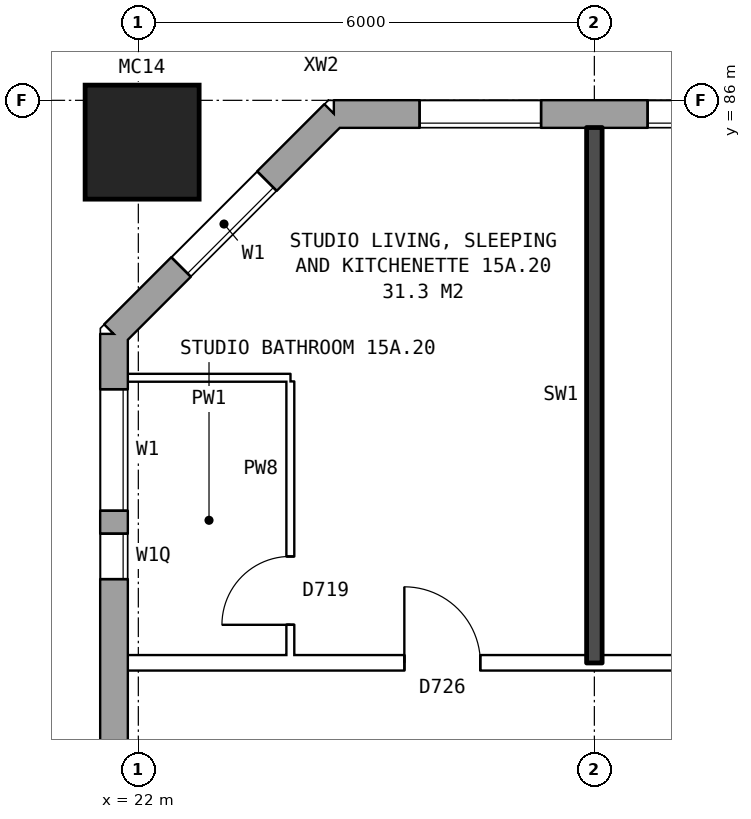
"""IFC4 building model, lengths in metres.
Left out: names, types, materials, properties, quantities, classifications, styles, units other than length and angle.
Written with IfcOpenShell. Run it as: python <this file> out.ifc"""

import sys

from ifc_helpers import new_model, si_unit, direction, frame, frame_2d, origin, origin_2d, place, context, subcontext, project, spatial, rectangle, hollow_rectangle, extrude, element, fill, save


model = new_model("IFC4")
c1 = context("Model", 3, precision=1e-05, world=origin(), true_north=direction((0.0, 1.0)))
c2 = subcontext(c1, "Body", "Model", "MODEL_VIEW")
j1 = project(units=[si_unit("LENGTHUNIT", "METRE"), si_unit("PLANEANGLEUNIT", "RADIAN")], contexts=[c1])
p1 = place(None, origin())
s1 = spatial("IfcSite", under=j1, at=p1, CompositionType="ELEMENT")
p2 = place(p1, origin())
s2 = spatial("IfcBuilding", under=s1, at=p2, CompositionType="ELEMENT")
p3 = place(p2, frame((0.0, 0.0, 56.7)))
s3 = spatial("IfcBuildingStorey", under=s2, at=p3, CompositionType="ELEMENT", Elevation=56.7)
p4 = place(p3, frame((22.05, 85.45, 0.0), z_axis=(0.0, 0.0, 1.0), x_axis=(1.0, 0.0, 0.0)))
e1 = element("IfcColumn", 1, at=p4, inside=s3, PredefinedType="COLUMN", context=c2, shape_type="SweptSolid", body=[
    extrude(hollow_rectangle(XDim=1.5, YDim=1.5, WallThickness=0.08, at=origin_2d()), origin(), (0.0, 0.0, 1.0), 3.1),
])
p5 = place(p3, frame((72.925, 85.82, 0.0), z_axis=(0.0, 0.0, 1.0), x_axis=(-1.0, 0.0, 0.0)))
e2 = element("IfcWall", 2, at=p5, inside=s3, PredefinedType="STANDARD", context=c2, shape_type="SweptSolid", body=[
    extrude(rectangle(XDim=48.351, YDim=0.36, at=frame_2d((24.175, 0.0))), origin(), (0.0, 0.0, 1.0), 2.85),
])
p6 = place(p5, frame((0.625, 0.0, 0.8)))
e3 = element("IfcOpeningElement", 3, at=p6, cuts=e2, PredefinedType="OPENING", context=c2, shape_type="SweptSolid", body=[
    extrude(rectangle(XDim=1.6, YDim=1.8, at=frame_2d((0.8, 0.9))), frame((0.0, 0.19, 0.0), z_axis=(0.0, -1.0, 0.0), x_axis=(1.0, 0.0, 0.0)), (0.0, 0.0, 1.0), 0.38),
])
p7 = place(p5, frame((3.625, 0.0, 0.8)))
e4 = element("IfcOpeningElement", 4, at=p7, cuts=e2, PredefinedType="OPENING", context=c2, shape_type="SweptSolid", body=[
    extrude(rectangle(XDim=1.6, YDim=1.8, at=frame_2d((0.8, 0.9))), frame((0.0, 0.19, 0.0), z_axis=(0.0, -1.0, 0.0), x_axis=(1.0, 0.0, 0.0)), (0.0, 0.0, 1.0), 0.38),
])
p8 = place(p5, frame((6.625, 0.0, 0.8)))
e5 = element("IfcOpeningElement", 5, at=p8, cuts=e2, PredefinedType="OPENING", context=c2, shape_type="SweptSolid", body=[
    extrude(rectangle(XDim=1.6, YDim=1.8, at=frame_2d((0.8, 0.9))), frame((0.0, 0.19, 0.0), z_axis=(0.0, -1.0, 0.0), x_axis=(1.0, 0.0, 0.0)), (0.0, 0.0, 1.0), 0.38),
])
p9 = place(p5, frame((9.625, 0.0, 0.8)))
e6 = element("IfcOpeningElement", 6, at=p9, cuts=e2, PredefinedType="OPENING", context=c2, shape_type="SweptSolid", body=[
    extrude(rectangle(XDim=1.6, YDim=1.8, at=frame_2d((0.8, 0.9))), frame((0.0, 0.19, 0.0), z_axis=(0.0, -1.0, 0.0), x_axis=(1.0, 0.0, 0.0)), (0.0, 0.0, 1.0), 0.38),
])
p10 = place(p5, frame((12.625, 0.0, 0.8)))
e7 = element("IfcOpeningElement", 7, at=p10, cuts=e2, PredefinedType="OPENING", context=c2, shape_type="SweptSolid", body=[
    extrude(rectangle(XDim=1.6, YDim=1.8, at=frame_2d((0.8, 0.9))), frame((0.0, 0.19, 0.0), z_axis=(0.0, -1.0, 0.0), x_axis=(1.0, 0.0, 0.0)), (0.0, 0.0, 1.0), 0.38),
])
p11 = place(p5, frame((15.125, 0.0, 0.8)))
e8 = element("IfcOpeningElement", 8, at=p11, cuts=e2, PredefinedType="OPENING", context=c2, shape_type="SweptSolid", body=[
    extrude(rectangle(XDim=1.0, YDim=1.8, at=frame_2d((0.5, 0.9))), frame((0.0, 0.19, 0.0), z_axis=(0.0, -1.0, 0.0), x_axis=(1.0, 0.0, 0.0)), (0.0, 0.0, 1.0), 0.38),
])
p12 = place(p5, frame((18.625, 0.0, 0.65)))
e9 = element("IfcOpeningElement", 9, at=p12, cuts=e2, PredefinedType="OPENING", context=c2, shape_type="SweptSolid", body=[
    extrude(rectangle(XDim=0.8, YDim=0.9, at=frame_2d((0.4, 0.45))), frame((0.0, 0.19, 0.0), z_axis=(0.0, -1.0, 0.0), x_axis=(1.0, 0.0, 0.0)), (0.0, 0.0, 1.0), 0.38),
])
p13 = place(p5, frame((21.625, 0.0, 0.8)))
e10 = element("IfcOpeningElement", 10, at=p13, cuts=e2, PredefinedType="OPENING", context=c2, shape_type="SweptSolid", body=[
    extrude(rectangle(XDim=1.6, YDim=1.8, at=frame_2d((0.8, 0.9))), frame((0.0, 0.19, 0.0), z_axis=(0.0, -1.0, 0.0), x_axis=(1.0, 0.0, 0.0)), (0.0, 0.0, 1.0), 0.38),
])
p14 = place(p5, frame((24.625, 0.0, 0.8)))
e11 = element("IfcOpeningElement", 11, at=p14, cuts=e2, PredefinedType="OPENING", context=c2, shape_type="SweptSolid", body=[
    extrude(rectangle(XDim=1.6, YDim=1.8, at=frame_2d((0.8, 0.9))), frame((0.0, 0.19, 0.0), z_axis=(0.0, -1.0, 0.0), x_axis=(1.0, 0.0, 0.0)), (0.0, 0.0, 1.0), 0.38),
])
p15 = place(p5, frame((27.125, 0.0, 0.8)))
e12 = element("IfcOpeningElement", 12, at=p15, cuts=e2, PredefinedType="OPENING", context=c2, shape_type="SweptSolid", body=[
    extrude(rectangle(XDim=1.0, YDim=1.8, at=frame_2d((0.5, 0.9))), frame((0.0, 0.19, 0.0), z_axis=(0.0, -1.0, 0.0), x_axis=(1.0, 0.0, 0.0)), (0.0, 0.0, 1.0), 0.38),
])
p16 = place(p5, frame((28.425, 0.0, 0.8)))
e13 = element("IfcOpeningElement", 13, at=p16, cuts=e2, PredefinedType="OPENING", context=c2, shape_type="SweptSolid", body=[
    extrude(rectangle(XDim=1.0, YDim=0.9, at=frame_2d((0.5, 0.45))), frame((0.0, 0.19, 0.0), z_axis=(0.0, -1.0, 0.0), x_axis=(1.0, 0.0, 0.0)), (0.0, 0.0, 1.0), 0.38),
])
p17 = place(p5, frame((33.625, 0.0, 0.8)))
e14 = element("IfcOpeningElement", 14, at=p17, cuts=e2, PredefinedType="OPENING", context=c2, shape_type="SweptSolid", body=[
    extrude(rectangle(XDim=1.6, YDim=1.8, at=frame_2d((0.8, 0.9))), frame((0.0, 0.19, 0.0), z_axis=(0.0, -1.0, 0.0), x_axis=(1.0, 0.0, 0.0)), (0.0, 0.0, 1.0), 0.38),
])
p18 = place(p5, frame((36.625, 0.0, 0.8)))
e15 = element("IfcOpeningElement", 15, at=p18, cuts=e2, PredefinedType="OPENING", context=c2, shape_type="SweptSolid", body=[
    extrude(rectangle(XDim=1.6, YDim=1.8, at=frame_2d((0.8, 0.9))), frame((0.0, 0.19, 0.0), z_axis=(0.0, -1.0, 0.0), x_axis=(1.0, 0.0, 0.0)), (0.0, 0.0, 1.0), 0.38),
])
p19 = place(p5, frame((39.625, 0.0, 0.8)))
e16 = element("IfcOpeningElement", 16, at=p19, cuts=e2, PredefinedType="OPENING", context=c2, shape_type="SweptSolid", body=[
    extrude(rectangle(XDim=1.6, YDim=1.8, at=frame_2d((0.8, 0.9))), frame((0.0, 0.19, 0.0), z_axis=(0.0, -1.0, 0.0), x_axis=(1.0, 0.0, 0.0)), (0.0, 0.0, 1.0), 0.38),
])
p20 = place(p5, frame((42.625, 0.0, 0.8)))
e17 = element("IfcOpeningElement", 17, at=p20, cuts=e2, PredefinedType="OPENING", context=c2, shape_type="SweptSolid", body=[
    extrude(rectangle(XDim=1.6, YDim=1.8, at=frame_2d((0.8, 0.9))), frame((0.0, 0.19, 0.0), z_axis=(0.0, -1.0, 0.0), x_axis=(1.0, 0.0, 0.0)), (0.0, 0.0, 1.0), 0.38),
])
p21 = place(p5, frame((45.625, 0.0, 0.8)))
e18 = element("IfcOpeningElement", 18, at=p21, cuts=e2, PredefinedType="OPENING", context=c2, shape_type="SweptSolid", body=[
    extrude(rectangle(XDim=1.6, YDim=1.8, at=frame_2d((0.8, 0.9))), frame((0.0, 0.19, 0.0), z_axis=(0.0, -1.0, 0.0), x_axis=(1.0, 0.0, 0.0)), (0.0, 0.0, 1.0), 0.38),
])
p22 = place(p5, frame((16.425, 0.0, 1.7)))
e19 = element("IfcOpeningElement", 19, at=p22, cuts=e2, PredefinedType="OPENING", context=c2, shape_type="SweptSolid", body=[
    extrude(rectangle(XDim=1.0, YDim=0.9, at=frame_2d((0.5, 0.45))), frame((0.0, 0.19, 0.0), z_axis=(0.0, -1.0, 0.0), x_axis=(1.0, 0.0, 0.0)), (0.0, 0.0, 1.0), 0.38),
])
p23 = place(p5, frame((19.725, 0.0, 0.75)))
e20 = element("IfcOpeningElement", 20, at=p23, cuts=e2, PredefinedType="OPENING", context=c2, shape_type="SweptSolid", body=[
    extrude(rectangle(XDim=1.0, YDim=1.5, at=frame_2d((0.5, 0.75))), frame((0.0, 0.19, 0.0), z_axis=(0.0, -1.0, 0.0), x_axis=(1.0, 0.0, 0.0)), (0.0, 0.0, 1.0), 0.38),
])
p24 = place(p5, frame((30.875, 0.0, 1.7)))
e21 = element("IfcOpeningElement", 21, at=p24, cuts=e2, PredefinedType="OPENING", context=c2, shape_type="SweptSolid", body=[
    extrude(rectangle(XDim=0.6, YDim=0.9, at=frame_2d((0.3, 0.45))), frame((0.0, 0.19, 0.0), z_axis=(0.0, -1.0, 0.0), x_axis=(1.0, 0.0, 0.0)), (0.0, 0.0, 1.0), 0.38),
])
p25 = place(p5, frame((31.775, 0.0, 1.1)))
e22 = element("IfcOpeningElement", 22, at=p25, cuts=e2, PredefinedType="OPENING", context=c2, shape_type="SweptSolid", body=[
    extrude(rectangle(XDim=0.8, YDim=1.5, at=frame_2d((0.4, 0.75))), frame((0.0, 0.19, 0.0), z_axis=(0.0, -1.0, 0.0), x_axis=(1.0, 0.0, 0.0)), (0.0, 0.0, 1.0), 0.38),
])
p26 = place(p3, frame((24.575, 85.82, 0.0), z_axis=(0.0, 0.0, 1.0), x_axis=(-0.707106781187, -0.707106781187, 0.0)))
e23 = element("IfcWall", 23, at=p26, inside=s3, PredefinedType="STANDARD", context=c2, shape_type="SweptSolid", body=[
    extrude(rectangle(XDim=4.094, YDim=0.36, at=frame_2d((2.047, 0.0))), origin(), (0.0, 0.0, 1.0), 2.85),
])
p27 = place(p26, frame((1.247, 0.0, 0.8)))
e24 = element("IfcOpeningElement", 24, at=p27, cuts=e23, PredefinedType="OPENING", context=c2, shape_type="SweptSolid", body=[
    extrude(rectangle(XDim=1.6, YDim=1.8, at=frame_2d((0.8, 0.9))), frame((0.0, 0.19, 0.0), z_axis=(0.0, -1.0, 0.0), x_axis=(1.0, 0.0, 0.0)), (0.0, 0.0, 1.0), 0.38),
])
p28 = place(p3, frame((21.68, 82.925, 0.0), z_axis=(0.0, 0.0, 1.0), x_axis=(0.0, -1.0, 0.0)))
e25 = element("IfcWall", 25, at=p28, inside=s3, PredefinedType="STANDARD", context=c2, shape_type="SweptSolid", body=[
    extrude(rectangle(XDim=25.851, YDim=0.36, at=frame_2d((12.925, 0.0))), origin(), (0.0, 0.0, 1.0), 2.85),
])
p29 = place(p28, frame((0.725, 0.0, 0.8)))
e26 = element("IfcOpeningElement", 26, at=p29, cuts=e25, PredefinedType="OPENING", context=c2, shape_type="SweptSolid", body=[
    extrude(rectangle(XDim=1.6, YDim=1.8, at=frame_2d((0.8, 0.9))), frame((0.0, 0.19, 0.0), z_axis=(0.0, -1.0, 0.0), x_axis=(1.0, 0.0, 0.0)), (0.0, 0.0, 1.0), 0.38),
])
p30 = place(p28, frame((5.525, 0.0, 1.4)))
e27 = element("IfcOpeningElement", 27, at=p30, cuts=e25, PredefinedType="OPENING", context=c2, shape_type="SweptSolid", body=[
    extrude(rectangle(XDim=1.6, YDim=1.2, at=frame_2d((0.8, 0.6))), frame((0.0, 0.19, 0.0), z_axis=(0.0, -1.0, 0.0), x_axis=(1.0, 0.0, 0.0)), (0.0, 0.0, 1.0), 0.38),
])
p31 = place(p28, frame((7.625, 0.0, 0.8)))
e28 = element("IfcOpeningElement", 28, at=p31, cuts=e25, PredefinedType="OPENING", context=c2, shape_type="SweptSolid", body=[
    extrude(rectangle(XDim=1.6, YDim=1.8, at=frame_2d((0.8, 0.9))), frame((0.0, 0.19, 0.0), z_axis=(0.0, -1.0, 0.0), x_axis=(1.0, 0.0, 0.0)), (0.0, 0.0, 1.0), 0.38),
])
p32 = place(p28, frame((10.625, 0.0, 0.8)))
e29 = element("IfcOpeningElement", 29, at=p32, cuts=e25, PredefinedType="OPENING", context=c2, shape_type="SweptSolid", body=[
    extrude(rectangle(XDim=1.6, YDim=1.8, at=frame_2d((0.8, 0.9))), frame((0.0, 0.19, 0.0), z_axis=(0.0, -1.0, 0.0), x_axis=(1.0, 0.0, 0.0)), (0.0, 0.0, 1.0), 0.38),
])
p33 = place(p28, frame((13.625, 0.0, 0.8)))
e30 = element("IfcOpeningElement", 30, at=p33, cuts=e25, PredefinedType="OPENING", context=c2, shape_type="SweptSolid", body=[
    extrude(rectangle(XDim=1.6, YDim=1.8, at=frame_2d((0.8, 0.9))), frame((0.0, 0.19, 0.0), z_axis=(0.0, -1.0, 0.0), x_axis=(1.0, 0.0, 0.0)), (0.0, 0.0, 1.0), 0.38),
])
p34 = place(p28, frame((16.625, 0.0, 0.8)))
e31 = element("IfcOpeningElement", 31, at=p34, cuts=e25, PredefinedType="OPENING", context=c2, shape_type="SweptSolid", body=[
    extrude(rectangle(XDim=1.6, YDim=1.8, at=frame_2d((0.8, 0.9))), frame((0.0, 0.19, 0.0), z_axis=(0.0, -1.0, 0.0), x_axis=(1.0, 0.0, 0.0)), (0.0, 0.0, 1.0), 0.38),
])
p35 = place(p28, frame((9.525, 0.0, 0.8)))
e32 = element("IfcOpeningElement", 32, at=p35, cuts=e25, PredefinedType="OPENING", context=c2, shape_type="SweptSolid", body=[
    extrude(rectangle(XDim=0.8, YDim=1.8, at=frame_2d((0.4, 0.9))), frame((0.0, 0.19, 0.0), z_axis=(0.0, -1.0, 0.0), x_axis=(1.0, 0.0, 0.0)), (0.0, 0.0, 1.0), 0.38),
])
p36 = place(p28, frame((22.525, 0.0, 0.8)))
e33 = element("IfcOpeningElement", 33, at=p36, cuts=e25, PredefinedType="OPENING", context=c2, shape_type="SweptSolid", body=[
    extrude(rectangle(XDim=1.0, YDim=1.2, at=frame_2d((0.5, 0.6))), frame((0.0, 0.19, 0.0), z_axis=(0.0, -1.0, 0.0), x_axis=(1.0, 0.0, 0.0)), (0.0, 0.0, 1.0), 0.38),
])
p37 = place(p28, frame((2.625, 0.0, 0.8)))
e34 = element("IfcOpeningElement", 34, at=p37, cuts=e25, PredefinedType="OPENING", context=c2, shape_type="SweptSolid", body=[
    extrude(rectangle(XDim=0.6, YDim=1.2, at=frame_2d((0.3, 0.6))), frame((0.0, 0.19, 0.0), z_axis=(0.0, -1.0, 0.0), x_axis=(1.0, 0.0, 0.0)), (0.0, 0.0, 1.0), 0.38),
])
p38 = place(p28, frame((12.525, 0.0, 0.8)))
e35 = element("IfcOpeningElement", 35, at=p38, cuts=e25, PredefinedType="OPENING", context=c2, shape_type="SweptSolid", body=[
    extrude(rectangle(XDim=0.8, YDim=1.8, at=frame_2d((0.4, 0.9))), frame((0.0, 0.19, 0.0), z_axis=(0.0, -1.0, 0.0), x_axis=(1.0, 0.0, 0.0)), (0.0, 0.0, 1.0), 0.38),
])
p39 = place(p28, frame((15.525, 0.0, 0.8)))
e36 = element("IfcOpeningElement", 36, at=p39, cuts=e25, PredefinedType="OPENING", context=c2, shape_type="SweptSolid", body=[
    extrude(rectangle(XDim=0.8, YDim=1.8, at=frame_2d((0.4, 0.9))), frame((0.0, 0.19, 0.0), z_axis=(0.0, -1.0, 0.0), x_axis=(1.0, 0.0, 0.0)), (0.0, 0.0, 1.0), 0.38),
])
p40 = place(p28, frame((18.525, 0.0, 0.9)))
e37 = element("IfcOpeningElement", 37, at=p40, cuts=e25, PredefinedType="OPENING", context=c2, shape_type="SweptSolid", body=[
    extrude(rectangle(XDim=0.8, YDim=1.5, at=frame_2d((0.4, 0.75))), frame((0.0, 0.19, 0.0), z_axis=(0.0, -1.0, 0.0), x_axis=(1.0, 0.0, 0.0)), (0.0, 0.0, 1.0), 0.38),
])
p41 = place(p28, frame((23.825, 0.0, 0.8)))
e38 = element("IfcOpeningElement", 38, at=p41, cuts=e25, PredefinedType="OPENING", context=c2, shape_type="SweptSolid", body=[
    extrude(rectangle(XDim=1.4, YDim=1.8, at=frame_2d((0.7, 0.9))), frame((0.0, 0.19, 0.0), z_axis=(0.0, -1.0, 0.0), x_axis=(1.0, 0.0, 0.0)), (0.0, 0.0, 1.0), 0.38),
])
p42 = place(p3, frame((21.86, 78.6, 0.0), z_axis=(0.0, 0.0, 1.0), x_axis=(1.0, 0.0, 0.0)))
e39 = element("IfcWall", 39, at=p42, inside=s3, PredefinedType="PARTITIONING", context=c2, shape_type="SweptSolid", body=[
    extrude(rectangle(XDim=24.04, YDim=0.2, at=frame_2d((12.02, 0.0))), origin(), (0.0, 0.0, 1.0), 2.85),
])
p43 = place(p42, frame((20.59, 0.0, 0.0)))
e40 = element("IfcOpeningElement", 40, at=p43, cuts=e39, PredefinedType="OPENING", context=c2, shape_type="SweptSolid", body=[
    extrude(rectangle(XDim=1.0, YDim=2.1, at=frame_2d((0.5, 1.05))), frame((0.0, 0.11, 0.0), z_axis=(0.0, -1.0, 0.0), x_axis=(1.0, 0.0, 0.0)), (0.0, 0.0, 1.0), 0.22),
])
p44 = place(p42, frame((8.64, 0.0, 0.0)))
e41 = element("IfcOpeningElement", 41, at=p44, cuts=e39, PredefinedType="OPENING", context=c2, shape_type="SweptSolid", body=[
    extrude(rectangle(XDim=1.0, YDim=2.1, at=frame_2d((0.5, 1.05))), frame((0.0, 0.11, 0.0), z_axis=(0.0, -1.0, 0.0), x_axis=(1.0, 0.0, 0.0)), (0.0, 0.0, 1.0), 0.22),
])
p45 = place(p42, frame((3.64, 0.0, 0.0)))
e42 = element("IfcOpeningElement", 42, at=p45, cuts=e39, PredefinedType="OPENING", context=c2, shape_type="SweptSolid", body=[
    extrude(rectangle(XDim=1.0, YDim=2.1, at=frame_2d((0.5, 1.05))), frame((0.0, 0.11, 0.0), z_axis=(0.0, -1.0, 0.0), x_axis=(1.0, 0.0, 0.0)), (0.0, 0.0, 1.0), 0.22),
])
p46 = place(p3, frame((21.86, 82.35, 0.0), z_axis=(0.0, 0.0, 1.0), x_axis=(1.0, 0.0, 0.0)))
e43 = element("IfcWall", 43, at=p46, inside=s3, PredefinedType="PARTITIONING", context=c2, shape_type="SweptSolid", body=[
    extrude(rectangle(XDim=2.14, YDim=0.1, at=frame_2d((1.07, 0.0))), origin(), (0.0, 0.0, 1.0), 2.85),
])
p47 = place(p3, frame((24.0, 78.7, 0.0), z_axis=(0.0, 0.0, 1.0), x_axis=(0.0, 1.0, 0.0)))
e44 = element("IfcWall", 44, at=p47, inside=s3, PredefinedType="PARTITIONING", context=c2, shape_type="SweptSolid", body=[
    extrude(rectangle(XDim=3.6, YDim=0.1, at=frame_2d((1.8, 0.0))), origin(), (0.0, 0.0, 1.0), 2.85),
])
p48 = place(p47, frame((0.4, 0.0, 0.0)))
e45 = element("IfcOpeningElement", 45, at=p48, cuts=e44, PredefinedType="OPENING", context=c2, shape_type="SweptSolid", body=[
    extrude(rectangle(XDim=0.9, YDim=2.1, at=frame_2d((0.45, 1.05))), frame((0.0, 0.06, 0.0), z_axis=(0.0, -1.0, 0.0), x_axis=(1.0, 0.0, 0.0)), (0.0, 0.0, 1.0), 0.12),
])
p49 = place(p3, frame((28.0, 78.6, 0.0), z_axis=(0.0, 0.0, 1.0), x_axis=(0.0, 1.0, 0.0)))
e46 = element("IfcWall", 46, at=p49, inside=s3, PredefinedType="SOLIDWALL", context=c2, shape_type="SweptSolid", body=[
    extrude(rectangle(XDim=7.04, YDim=0.2, at=frame_2d((3.52, 0.0))), origin(), (0.0, 0.0, 1.0), 2.85),
])
p50 = place(p20, origin())
e47 = element("IfcWindow", 47, at=p50, inside=s3, PartitioningType="SINGLE_PANEL", PredefinedType="WINDOW", context=c2, shape_type="SweptSolid", body=[
    extrude(rectangle(XDim=1.6, YDim=1.8, at=frame_2d((0.8, 0.9))), frame((0.0, 0.15, 0.0), z_axis=(0.0, -1.0, 0.0), x_axis=(1.0, 0.0, 0.0)), (0.0, 0.0, 1.0), 0.06),
])
fill(e17, e47)
p51 = place(p21, origin())
e48 = element("IfcWindow", 48, at=p51, inside=s3, PartitioningType="SINGLE_PANEL", PredefinedType="WINDOW", context=c2, shape_type="SweptSolid", body=[
    extrude(rectangle(XDim=1.6, YDim=1.8, at=frame_2d((0.8, 0.9))), frame((0.0, 0.15, 0.0), z_axis=(0.0, -1.0, 0.0), x_axis=(1.0, 0.0, 0.0)), (0.0, 0.0, 1.0), 0.06),
])
fill(e18, e48)
p52 = place(p27, origin())
e49 = element("IfcWindow", 49, at=p52, inside=s3, PartitioningType="SINGLE_PANEL", PredefinedType="WINDOW", context=c2, shape_type="SweptSolid", body=[
    extrude(rectangle(XDim=1.6, YDim=1.8, at=frame_2d((0.8, 0.9))), frame((0.0, 0.15, 0.0), z_axis=(0.0, -1.0, 0.0), x_axis=(1.0, 0.0, 0.0)), (0.0, 0.0, 1.0), 0.06),
])
fill(e24, e49)
p53 = place(p29, origin())
e50 = element("IfcWindow", 50, at=p53, inside=s3, PartitioningType="SINGLE_PANEL", PredefinedType="WINDOW", context=c2, shape_type="SweptSolid", body=[
    extrude(rectangle(XDim=1.6, YDim=1.8, at=frame_2d((0.8, 0.9))), frame((0.0, 0.15, 0.0), z_axis=(0.0, -1.0, 0.0), x_axis=(1.0, 0.0, 0.0)), (0.0, 0.0, 1.0), 0.06),
])
fill(e26, e50)
p54 = place(p45, origin())
e51 = element("IfcDoor", 51, at=p54, inside=s3, OperationType="SINGLE_SWING_LEFT", PredefinedType="DOOR", context=c2, shape_type="SweptSolid", body=[
    extrude(rectangle(XDim=1.0, YDim=2.1, at=frame_2d((0.5, 1.05))), frame((0.0, 0.025, 0.0), z_axis=(0.0, -1.0, 0.0), x_axis=(1.0, 0.0, 0.0)), (0.0, 0.0, 1.0), 0.05),
])
fill(e42, e51)
p55 = place(p48, origin())
e52 = element("IfcDoor", 52, at=p55, inside=s3, OperationType="SINGLE_SWING_LEFT", PredefinedType="DOOR", context=c2, shape_type="SweptSolid", body=[
    extrude(rectangle(XDim=0.9, YDim=2.1, at=frame_2d((0.45, 1.05))), frame((0.0, 0.025, 0.0), z_axis=(0.0, -1.0, 0.0), x_axis=(1.0, 0.0, 0.0)), (0.0, 0.0, 1.0), 0.05),
])
fill(e45, e52)
p56 = place(p37, origin())
e53 = element("IfcWindow", 53, at=p56, inside=s3, PartitioningType="SINGLE_PANEL", PredefinedType="WINDOW", context=c2, shape_type="SweptSolid", body=[
    extrude(rectangle(XDim=0.6, YDim=1.2, at=frame_2d((0.3, 0.6))), frame((0.0, 0.15, 0.0), z_axis=(0.0, -1.0, 0.0), x_axis=(1.0, 0.0, 0.0)), (0.0, 0.0, 1.0), 0.06),
])
fill(e34, e53)
save(model, sys.argv[1])
